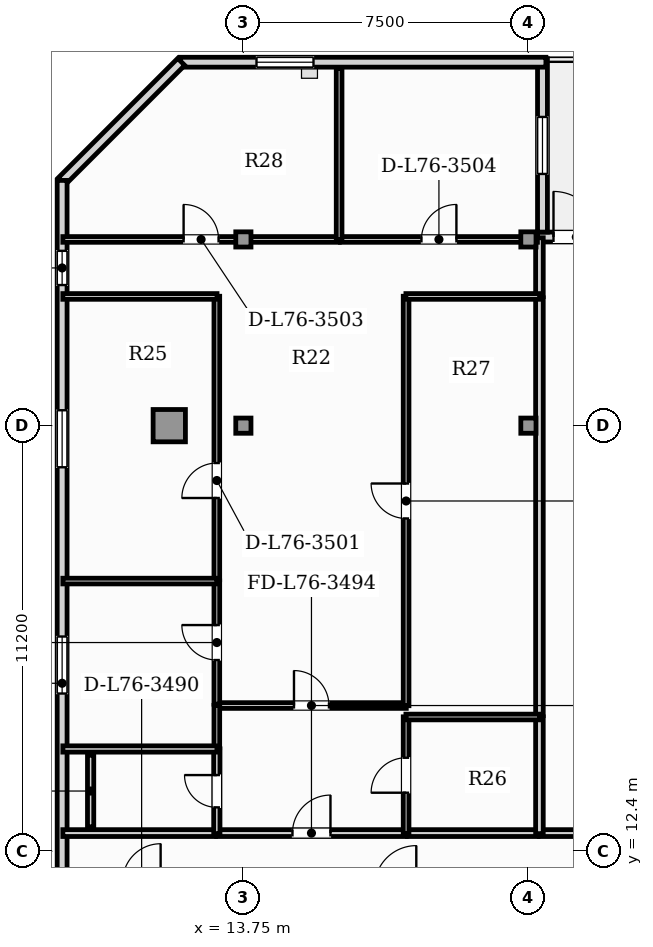
"""IFC4 building model, lengths in metres.
Left out: names, types, materials, properties, quantities, classifications, styles, units other than length and angle.
Written with IfcOpenShell. Run it as: python <this file> out.ifc"""

import sys

from ifc_helpers import new_model, si_unit, direction, frame, frame_2d, origin, origin_2d, place, context, subcontext, project, spatial, rectangle, hollow_rectangle, extrude, element, fill, save


model = new_model("IFC4")
c1 = context("Model", 3, precision=1e-05, world=origin(), true_north=direction((0.0, 1.0)))
c2 = subcontext(c1, "Body", "Model", "MODEL_VIEW")
j1 = project(units=[si_unit("LENGTHUNIT", "METRE"), si_unit("PLANEANGLEUNIT", "RADIAN")], contexts=[c1])
p1 = place(None, origin())
s1 = spatial("IfcSite", under=j1, at=p1, CompositionType="ELEMENT")
p2 = place(p1, origin())
s2 = spatial("IfcBuilding", under=s1, at=p2, CompositionType="ELEMENT")
p3 = place(p2, frame((0.0, 0.0, 308.0)))
s3 = spatial("IfcBuildingStorey", under=s2, at=p3, CompositionType="ELEMENT", Elevation=308.0)
p4 = place(p3, frame((11.8, 23.6, 0.0), z_axis=(0.0, 0.0, 1.0), x_axis=(1.0, 0.0, 0.0)))
e1 = element("IfcColumn", 1, at=p4, inside=s3, PredefinedType="USERDEFINED", context=c2, shape_type="SweptSolid", body=[
    extrude(hollow_rectangle(XDim=0.85, YDim=0.85, WallThickness=0.05, at=origin_2d()), origin(), (0.0, 0.0, 1.0), 5.05),
])
for number, where, z_axis, x_axis in (
    (2, (13.75, 23.6, 0.0), (0.0, 0.0, 1.0), (1.0, 0.0, 0.0)),
    (3, (21.25, 23.6, 0.0), (0.0, 0.0, 1.0), (1.0, 0.0, 0.0)),
    (4, (13.75, 28.5, 0.0), (0.0, 0.0, 1.0), (1.0, 0.0, 0.0)),
    (5, (21.25, 28.5, 0.0), (0.0, 0.0, 1.0), (1.0, 0.0, 0.0)),
):
    element("IfcColumn", number, at=place(p3, frame(where, z_axis=z_axis, x_axis=x_axis)), inside=s3, PredefinedType="COLUMN", context=c2, shape_type="SweptSolid", body=[
        extrude(hollow_rectangle(XDim=0.4, YDim=0.4, WallThickness=0.02, at=origin_2d()), origin(), (0.0, 0.0, 1.0), 5.05),
    ])
p5 = place(p3, frame((21.49, 28.563, 0.0), z_axis=(0.0, 0.0, 1.0), x_axis=(1.0, 0.0, 0.0)))
e6 = element("IfcWall", 6, at=p5, inside=s3, PredefinedType="SOLIDWALL", context=c2, shape_type="SweptSolid", body=[
    extrude(rectangle(XDim=1.76, YDim=0.26, at=frame_2d((0.88, 0.0))), origin(), (0.0, 0.0, 1.0), 4.85),
])
p6 = place(p5, frame((0.42, 0.0, 0.0)))
e7 = element("IfcOpeningElement", 7, at=p6, cuts=e6, PredefinedType="OPENING", context=c2, shape_type="SweptSolid", body=[
    extrude(rectangle(XDim=1.2, YDim=2.2, at=frame_2d((0.6, 1.1))), frame((0.0, 0.14, 0.0), z_axis=(0.0, -1.0, 0.0), x_axis=(1.0, 0.0, 0.0)), (0.0, 0.0, 1.0), 0.28),
])
p7 = place(p3, frame((21.62, 28.693, 0.0), z_axis=(0.0, 0.0, 1.0), x_axis=(0.0, 1.0, 0.0)))
e8 = element("IfcWall", 8, at=p7, inside=s3, PredefinedType="SOLIDWALL", context=c2, shape_type="SweptSolid", body=[
    extrude(rectangle(XDim=4.56, YDim=0.26, at=frame_2d((2.28, 0.0))), origin(), (0.0, 0.0, 1.0), 4.85),
])
p8 = place(p7, frame((1.53, 0.0, 0.9)))
e9 = element("IfcOpeningElement", 9, at=p8, cuts=e8, PredefinedType="OPENING", context=c2, shape_type="SweptSolid", body=[
    extrude(rectangle(XDim=1.5, YDim=1.95, at=frame_2d((0.75, 0.975))), frame((0.0, 0.14, 0.0), z_axis=(0.0, -1.0, 0.0), x_axis=(1.0, 0.0, 0.0)), (0.0, 0.0, 1.0), 0.28),
])
p9 = place(p3, frame((21.71, 33.163, 0.0), z_axis=(0.0, 0.0, 1.0), x_axis=(-1.0, 0.0, 0.0)))
e10 = element("IfcWall", 10, at=p9, inside=s3, PredefinedType="SOLIDWALL", context=c2, shape_type="SweptSolid", body=[
    extrude(rectangle(XDim=9.619, YDim=0.26, at=frame_2d((4.81, 0.0))), origin(), (0.0, 0.0, 1.0), 4.85),
])
p10 = place(p9, frame((6.115, 0.0, 0.9)))
e11 = element("IfcOpeningElement", 11, at=p10, cuts=e10, PredefinedType="OPENING", context=c2, shape_type="SweptSolid", body=[
    extrude(rectangle(XDim=1.5, YDim=1.95, at=frame_2d((0.75, 0.975))), frame((0.0, 0.14, 0.0), z_axis=(0.0, -1.0, 0.0), x_axis=(1.0, 0.0, 0.0)), (0.0, 0.0, 1.0), 0.28),
])
p11 = place(p3, frame((12.115, 33.173, 0.0), z_axis=(0.0, 0.0, 1.0), x_axis=(-0.707134240044, -0.707079321262, 0.0)))
e12 = element("IfcWall", 12, at=p11, inside=s3, PredefinedType="SOLIDWALL", context=c2, shape_type="SweptSolid", body=[
    extrude(rectangle(XDim=4.446, YDim=0.26, at=frame_2d((2.223, 0.0))), origin(), (0.0, 0.0, 1.0), 4.85),
])
p12 = place(p3, frame((8.981, 30.053, 0.0), z_axis=(0.0, 0.0, 1.0), x_axis=(0.0, -1.0, 0.0)))
e13 = element("IfcWall", 13, at=p12, inside=s3, PredefinedType="SOLIDWALL", context=c2, shape_type="SweptSolid", body=[
    extrude(rectangle(XDim=26.813, YDim=0.26, at=frame_2d((13.406, 0.0))), origin(), (0.0, 0.0, 1.0), 4.85),
])
p13 = place(p12, frame((20.763, 0.0, 0.85)))
e14 = element("IfcOpeningElement", 14, at=p13, cuts=e13, PredefinedType="OPENING", context=c2, shape_type="SweptSolid", body=[
    extrude(rectangle(XDim=2.4, YDim=2.0, at=frame_2d((1.2, 1.0))), frame((0.0, 0.14, 0.0), z_axis=(0.0, -1.0, 0.0), x_axis=(1.0, 0.0, 0.0)), (0.0, 0.0, 1.0), 0.28),
])
p14 = place(p12, frame((1.853, 0.0, 0.95)))
e15 = element("IfcOpeningElement", 15, at=p14, cuts=e13, PredefinedType="OPENING", context=c2, shape_type="SweptSolid", body=[
    extrude(rectangle(XDim=0.9, YDim=1.5, at=frame_2d((0.45, 0.75))), frame((0.0, 0.14, 0.0), z_axis=(0.0, -1.0, 0.0), x_axis=(1.0, 0.0, 0.0)), (0.0, 0.0, 1.0), 0.28),
])
p15 = place(p12, frame((12.001, 0.0, 0.9)))
e16 = element("IfcOpeningElement", 16, at=p15, cuts=e13, PredefinedType="OPENING", context=c2, shape_type="SweptSolid", body=[
    extrude(rectangle(XDim=1.5, YDim=1.95, at=frame_2d((0.75, 0.975))), frame((0.0, 0.14, 0.0), z_axis=(0.0, -1.0, 0.0), x_axis=(1.0, 0.0, 0.0)), (0.0, 0.0, 1.0), 0.28),
])
p16 = place(p12, frame((6.048, 0.0, 0.9)))
e17 = element("IfcOpeningElement", 17, at=p16, cuts=e13, PredefinedType="OPENING", context=c2, shape_type="SweptSolid", body=[
    extrude(rectangle(XDim=1.5, YDim=1.95, at=frame_2d((0.75, 0.975))), frame((0.0, 0.14, 0.0), z_axis=(0.0, -1.0, 0.0), x_axis=(1.0, 0.0, 0.0)), (0.0, 0.0, 1.0), 0.28),
])
p17 = place(p3, frame((21.535, 12.88, 0.0), z_axis=(0.0, 0.0, 1.0), x_axis=(1.0, 0.0, 0.0)))
e18 = element("IfcWall", 18, at=p17, inside=s3, PredefinedType="PARTITIONING", context=c2, shape_type="SweptSolid", body=[
    extrude(rectangle(XDim=11.33, YDim=0.18, at=frame_2d((5.665, 0.0))), origin(), (0.0, 0.0, 1.0), 4.85),
])
p18 = place(p17, frame((3.466, 0.0, 0.0)))
e19 = element("IfcOpeningElement", 19, at=p18, cuts=e18, PredefinedType="OPENING", context=c2, shape_type="SweptSolid", body=[
    extrude(rectangle(XDim=1.0, YDim=2.15, at=frame_2d((0.5, 1.075))), frame((0.0, 0.1, 0.0), z_axis=(0.0, -1.0, 0.0), x_axis=(1.0, 0.0, 0.0)), (0.0, 0.0, 1.0), 0.2),
])
p19 = place(p3, frame((13.047, 12.88, 0.0), z_axis=(0.0, 0.0, 1.0), x_axis=(1.0, 0.0, 0.0)))
e20 = element("IfcWall", 20, at=p19, inside=s3, PredefinedType="PARTITIONING", context=c2, shape_type="SweptSolid", body=[
    extrude(rectangle(XDim=4.99, YDim=0.18, at=frame_2d((2.495, 0.0))), origin(), (0.0, 0.0, 1.0), 4.85),
])
p20 = place(p19, frame((1.995, 0.0, 0.0)))
e21 = element("IfcOpeningElement", 21, at=p20, cuts=e20, PredefinedType="OPENING", context=c2, shape_type="SweptSolid", body=[
    extrude(rectangle(XDim=1.0, YDim=2.15, at=frame_2d((0.5, 1.075))), frame((0.0, 0.1, 0.0), z_axis=(0.0, -1.0, 0.0), x_axis=(1.0, 0.0, 0.0)), (0.0, 0.0, 1.0), 0.2),
])
p21 = place(p3, frame((9.0, 12.88, 0.0), z_axis=(0.0, 0.0, 1.0), x_axis=(1.0, 0.0, 0.0)))
e22 = element("IfcWall", 22, at=p21, inside=s3, PredefinedType="PARTITIONING", context=c2, shape_type="SweptSolid", body=[
    extrude(rectangle(XDim=4.016, YDim=0.18, at=frame_2d((2.008, 0.0))), origin(), (0.0, 0.0, 1.0), 4.85),
])
p22 = place(p3, frame((18.067, 12.88, 0.0), z_axis=(0.0, 0.0, 1.0), x_axis=(1.0, 0.0, 0.0)))
e23 = element("IfcWall", 23, at=p22, inside=s3, PredefinedType="PARTITIONING", context=c2, shape_type="SweptSolid", body=[
    extrude(rectangle(XDim=3.438, YDim=0.18, at=frame_2d((1.719, 0.0))), origin(), (0.0, 0.0, 1.0), 4.85),
])
p23 = place(p3, frame((21.54, 26.995, 0.0), z_axis=(0.0, 0.0, 1.0), x_axis=(0.0, 1.0, 0.0)))
e24 = element("IfcWall", 24, at=p23, inside=s3, PredefinedType="PARTITIONING", context=c2, shape_type="SweptSolid", body=[
    extrude(rectangle(XDim=1.549, YDim=0.2, at=frame_2d((0.774, 0.0))), origin(), (0.0, 0.0, 1.0), 4.85),
])
p24 = place(p3, frame((21.54, 12.865, 0.0), z_axis=(0.0, 0.0, 1.0), x_axis=(0.0, 1.0, 0.0)))
e25 = element("IfcWall", 25, at=p24, inside=s3, PredefinedType="PARTITIONING", context=c2, shape_type="SweptSolid", body=[
    extrude(rectangle(XDim=3.074, YDim=0.2, at=frame_2d((1.537, 0.0))), origin(), (0.0, 0.0, 1.0), 4.85),
])
p25 = place(p3, frame((21.54, 15.969, 0.0), z_axis=(0.0, 0.0, 1.0), x_axis=(0.0, 1.0, 0.0)))
e26 = element("IfcWall", 26, at=p25, inside=s3, PredefinedType="PARTITIONING", context=c2, shape_type="SweptSolid", body=[
    extrude(rectangle(XDim=10.996, YDim=0.2, at=frame_2d((5.498, 0.0))), origin(), (0.0, 0.0, 1.0), 4.85),
])
p26 = place(p3, frame((13.047, 16.236, 0.0), z_axis=(0.0, 0.0, 1.0), x_axis=(1.0, 0.0, 0.0)))
e27 = element("IfcWall", 27, at=p26, inside=s3, PredefinedType="PARTITIONING", context=c2, shape_type="SweptSolid", body=[
    extrude(rectangle(XDim=4.99, YDim=0.15, at=frame_2d((2.495, 0.0))), origin(), (0.0, 0.0, 1.0), 4.85),
])
p27 = place(p26, frame((2.035, 0.0, 0.0)))
e28 = element("IfcOpeningElement", 28, at=p27, cuts=e27, PredefinedType="OPENING", context=c2, shape_type="SweptSolid", body=[
    extrude(rectangle(XDim=0.92, YDim=2.1, at=frame_2d((0.46, 1.05))), frame((0.0, 0.085, 0.0), z_axis=(0.0, -1.0, 0.0), x_axis=(1.0, 0.0, 0.0)), (0.0, 0.0, 1.0), 0.17),
])
p28 = place(p3, frame((13.052, 12.865, 0.0), z_axis=(0.0, 0.0, 1.0), x_axis=(0.0, 1.0, 0.0)))
e29 = element("IfcWall", 29, at=p28, inside=s3, PredefinedType="PLUMBINGWALL", context=c2, shape_type="SweptSolid", body=[
    extrude(rectangle(XDim=2.233, YDim=0.165, at=frame_2d((1.116, 0.0))), origin(), (0.0, 0.0, 1.0), 4.85),
])
p29 = place(p28, frame((0.691, 0.0, 0.0)))
e30 = element("IfcOpeningElement", 30, at=p29, cuts=e29, PredefinedType="OPENING", context=c2, shape_type="SweptSolid", body=[
    extrude(rectangle(XDim=0.85, YDim=2.1, at=frame_2d((0.425, 1.05))), frame((0.0, 0.093, 0.0), z_axis=(0.0, -1.0, 0.0), x_axis=(1.0, 0.0, 0.0)), (0.0, 0.0, 1.0), 0.185),
])
p30 = place(p3, frame((13.052, 15.128, 0.0), z_axis=(0.0, 0.0, 1.0), x_axis=(0.0, 1.0, 0.0)))
e31 = element("IfcWall", 31, at=p30, inside=s3, PredefinedType="PARTITIONING", context=c2, shape_type="SweptSolid", body=[
    extrude(rectangle(XDim=1.114, YDim=0.15, at=frame_2d((0.557, 0.0))), origin(), (0.0, 0.0, 1.0), 4.85),
])
p31 = place(p3, frame((18.031, 12.865, 0.0), z_axis=(0.0, 0.0, 1.0), x_axis=(0.0, 1.0, 0.0)))
e32 = element("IfcWall", 32, at=p31, inside=s3, PredefinedType="PARTITIONING", context=c2, shape_type="SweptSolid", body=[
    extrude(rectangle(XDim=3.074, YDim=0.15, at=frame_2d((1.537, 0.0))), origin(), (0.0, 0.0, 1.0), 4.85),
])
p32 = place(p31, frame((1.077, 0.0, 0.0)))
e33 = element("IfcOpeningElement", 33, at=p32, cuts=e32, PredefinedType="OPENING", context=c2, shape_type="SweptSolid", body=[
    extrude(rectangle(XDim=0.92, YDim=2.1, at=frame_2d((0.46, 1.05))), frame((0.0, 0.085, 0.0), z_axis=(0.0, -1.0, 0.0), x_axis=(1.0, 0.0, 0.0)), (0.0, 0.0, 1.0), 0.17),
])
p33 = place(p3, frame((13.052, 16.271, 0.0), z_axis=(0.0, 0.0, 1.0), x_axis=(0.0, 1.0, 0.0)))
e34 = element("IfcWall", 34, at=p33, inside=s3, PredefinedType="PARTITIONING", context=c2, shape_type="SweptSolid", body=[
    extrude(rectangle(XDim=3.245, YDim=0.15, at=frame_2d((1.623, 0.0))), origin(), (0.0, 0.0, 1.0), 4.85),
])
p34 = place(p33, frame((1.162, 0.0, 0.0)))
e35 = element("IfcOpeningElement", 35, at=p34, cuts=e34, PredefinedType="OPENING", context=c2, shape_type="SweptSolid", body=[
    extrude(rectangle(XDim=0.92, YDim=2.1, at=frame_2d((0.46, 1.05))), frame((0.0, 0.085, 0.0), z_axis=(0.0, -1.0, 0.0), x_axis=(1.0, 0.0, 0.0)), (0.0, 0.0, 1.0), 0.17),
])
p35 = place(p3, frame((13.052, 19.546, 0.0), z_axis=(0.0, 0.0, 1.0), x_axis=(0.0, 1.0, 0.0)))
e36 = element("IfcWall", 36, at=p35, inside=s3, PredefinedType="PARTITIONING", context=c2, shape_type="SweptSolid", body=[
    extrude(rectangle(XDim=7.459, YDim=0.15, at=frame_2d((3.729, 0.0))), origin(), (0.0, 0.0, 1.0), 4.85),
])
p36 = place(p35, frame((2.151, 0.0, 0.0)))
e37 = element("IfcOpeningElement", 37, at=p36, cuts=e36, PredefinedType="OPENING", context=c2, shape_type="SweptSolid", body=[
    extrude(rectangle(XDim=0.92, YDim=2.1, at=frame_2d((0.46, 1.05))), frame((0.0, 0.085, 0.0), z_axis=(0.0, -1.0, 0.0), x_axis=(1.0, 0.0, 0.0)), (0.0, 0.0, 1.0), 0.17),
])
p37 = place(p3, frame((9.0, 27.0, 0.0), z_axis=(0.0, 0.0, 1.0), x_axis=(1.0, 0.0, 0.0)))
e38 = element("IfcWall", 38, at=p37, inside=s3, PredefinedType="PARTITIONING", context=c2, shape_type="SweptSolid", body=[
    extrude(rectangle(XDim=4.056, YDim=0.15, at=frame_2d((2.028, 0.0))), origin(), (0.0, 0.0, 1.0), 4.85),
])
p38 = place(p3, frame((18.031, 16.231, 0.0), z_axis=(0.0, 0.0, 1.0), x_axis=(0.0, 1.0, 0.0)))
e39 = element("IfcWall", 39, at=p38, inside=s3, PredefinedType="PARTITIONING", context=c2, shape_type="SweptSolid", body=[
    extrude(rectangle(XDim=10.774, YDim=0.15, at=frame_2d((5.387, 0.0))), origin(), (0.0, 0.0, 1.0), 4.85),
])
p39 = place(p38, frame((4.927, 0.0, 0.0)))
e40 = element("IfcOpeningElement", 40, at=p39, cuts=e39, PredefinedType="OPENING", context=c2, shape_type="SweptSolid", body=[
    extrude(rectangle(XDim=0.92, YDim=2.1, at=frame_2d((0.46, 1.05))), frame((0.0, 0.085, 0.0), z_axis=(0.0, -1.0, 0.0), x_axis=(1.0, 0.0, 0.0)), (0.0, 0.0, 1.0), 0.17),
])
p40 = place(p3, frame((18.027, 27.0, 0.0), z_axis=(0.0, 0.0, 1.0), x_axis=(1.0, 0.0, 0.0)))
e41 = element("IfcWall", 41, at=p40, inside=s3, PredefinedType="PARTITIONING", context=c2, shape_type="SweptSolid", body=[
    extrude(rectangle(XDim=3.518, YDim=0.15, at=frame_2d((1.759, 0.0))), origin(), (0.0, 0.0, 1.0), 4.85),
])
p41 = place(p3, frame((9.0, 28.5, 0.0), z_axis=(0.0, 0.0, 1.0), x_axis=(1.0, 0.0, 0.0)))
e42 = element("IfcWall", 42, at=p41, inside=s3, PredefinedType="PARTITIONING", context=c2, shape_type="SweptSolid", body=[
    extrude(rectangle(XDim=7.274, YDim=0.15, at=frame_2d((3.637, 0.0))), origin(), (0.0, 0.0, 1.0), 4.317),
])
p42 = place(p41, frame((3.177, 0.0, 0.0)))
e43 = element("IfcOpeningElement", 43, at=p42, cuts=e42, PredefinedType="OPENING", context=c2, shape_type="SweptSolid", body=[
    extrude(rectangle(XDim=0.92, YDim=2.1, at=frame_2d((0.46, 1.05))), frame((0.0, 0.085, 0.0), z_axis=(0.0, -1.0, 0.0), x_axis=(1.0, 0.0, 0.0)), (0.0, 0.0, 1.0), 0.17),
])
p43 = place(p3, frame((16.304, 28.5, 0.0), z_axis=(0.0, 0.0, 1.0), x_axis=(1.0, 0.0, 0.0)))
e44 = element("IfcWall", 44, at=p43, inside=s3, PredefinedType="PARTITIONING", context=c2, shape_type="SweptSolid", body=[
    extrude(rectangle(XDim=5.183, YDim=0.15, at=frame_2d((2.591, 0.0))), origin(), (0.0, 0.0, 1.0), 4.317),
])
p44 = place(p43, frame((2.131, 0.0, 0.0)))
e45 = element("IfcOpeningElement", 45, at=p44, cuts=e44, PredefinedType="OPENING", context=c2, shape_type="SweptSolid", body=[
    extrude(rectangle(XDim=0.92, YDim=2.1, at=frame_2d((0.46, 1.05))), frame((0.0, 0.085, 0.0), z_axis=(0.0, -1.0, 0.0), x_axis=(1.0, 0.0, 0.0)), (0.0, 0.0, 1.0), 0.17),
])
p45 = place(p3, frame((9.0, 15.093, 0.0), z_axis=(0.0, 0.0, 1.0), x_axis=(1.0, 0.0, 0.0)))
e46 = element("IfcWall", 46, at=p45, inside=s3, PredefinedType="PLUMBINGWALL", context=c2, shape_type="SweptSolid", body=[
    extrude(rectangle(XDim=4.056, YDim=0.165, at=frame_2d((2.028, 0.0))), origin(), (0.0, 0.0, 1.0), 4.85),
])
p46 = place(p3, frame((9.0, 19.511, 0.0), z_axis=(0.0, 0.0, 1.0), x_axis=(1.0, 0.0, 0.0)))
e47 = element("IfcWall", 47, at=p46, inside=s3, PredefinedType="PARTITIONING", context=c2, shape_type="SweptSolid", body=[
    extrude(rectangle(XDim=4.056, YDim=0.15, at=frame_2d((2.028, 0.0))), origin(), (0.0, 0.0, 1.0), 4.85),
])
p47 = place(p3, frame((18.027, 15.934, 0.0), z_axis=(0.0, 0.0, 1.0), x_axis=(1.0, 0.0, 0.0)))
e48 = element("IfcWall", 48, at=p47, inside=s3, PredefinedType="PARTITIONING", context=c2, shape_type="SweptSolid", body=[
    extrude(rectangle(XDim=3.518, YDim=0.15, at=frame_2d((1.759, 0.0))), origin(), (0.0, 0.0, 1.0), 4.85),
])
p48 = place(p3, frame((16.269, 28.495, 0.0), z_axis=(0.0, 0.0, 1.0), x_axis=(0.0, 1.0, 0.0)))
e49 = element("IfcWall", 49, at=p48, inside=s3, PredefinedType="PARTITIONING", context=c2, shape_type="SweptSolid", body=[
    extrude(rectangle(XDim=4.501, YDim=0.15, at=frame_2d((2.25, 0.0))), origin(), (0.0, 0.0, 1.0), 4.85),
])
p49 = place(p3, frame((9.731, 13.045, 0.0), z_axis=(0.0, 0.0, 1.0), x_axis=(0.0, 1.0, 0.0)))
e50 = element("IfcWall", 50, at=p49, inside=s3, PredefinedType="PLUMBINGWALL", context=c2, shape_type="SweptSolid", body=[
    extrude(rectangle(XDim=1.883, YDim=0.165, at=frame_2d((0.941, 0.0))), origin(), (0.0, 0.0, 1.0), 4.85),
])
p50 = place(p6, origin())
e51 = element("IfcDoor", 51, at=p50, inside=s3, OperationType="SINGLE_SWING_LEFT", PredefinedType="DOOR", context=c2, shape_type="SweptSolid", body=[
    extrude(rectangle(XDim=1.2, YDim=2.2, at=frame_2d((0.6, 1.1))), frame((0.0, 0.025, 0.0), z_axis=(0.0, -1.0, 0.0), x_axis=(1.0, 0.0, 0.0)), (0.0, 0.0, 1.0), 0.05),
])
fill(e7, e51)
p51 = place(p14, origin())
e52 = element("IfcWindow", 52, at=p51, inside=s3, PartitioningType="SINGLE_PANEL", PredefinedType="WINDOW", context=c2, shape_type="SweptSolid", body=[
    extrude(rectangle(XDim=0.9, YDim=1.5, at=frame_2d((0.45, 0.75))), frame((0.0, 0.03, 0.0), z_axis=(0.0, -1.0, 0.0), x_axis=(1.0, 0.0, 0.0)), (0.0, 0.0, 1.0), 0.06),
])
fill(e15, e52)
p52 = place(p15, origin())
e53 = element("IfcWindow", 53, at=p52, inside=s3, PartitioningType="SINGLE_PANEL", PredefinedType="WINDOW", context=c2, shape_type="SweptSolid", body=[
    extrude(rectangle(XDim=1.5, YDim=1.95, at=frame_2d((0.75, 0.975))), frame((0.0, 0.03, 0.0), z_axis=(0.0, -1.0, 0.0), x_axis=(1.0, 0.0, 0.0)), (0.0, 0.0, 1.0), 0.06),
])
fill(e16, e53)
p53 = place(p16, origin())
e54 = element("IfcWindow", 54, at=p53, inside=s3, PartitioningType="SINGLE_PANEL", PredefinedType="WINDOW", context=c2, shape_type="SweptSolid", body=[
    extrude(rectangle(XDim=1.5, YDim=1.95, at=frame_2d((0.75, 0.975))), frame((0.0, 0.03, 0.0), z_axis=(0.0, -1.0, 0.0), x_axis=(1.0, 0.0, 0.0)), (0.0, 0.0, 1.0), 0.06),
])
fill(e17, e54)
p54 = place(p10, origin())
e55 = element("IfcWindow", 55, at=p54, inside=s3, PartitioningType="SINGLE_PANEL", PredefinedType="WINDOW", context=c2, shape_type="SweptSolid", body=[
    extrude(rectangle(XDim=1.5, YDim=1.95, at=frame_2d((0.75, 0.975))), frame((0.0, 0.03, 0.0), z_axis=(0.0, -1.0, 0.0), x_axis=(1.0, 0.0, 0.0)), (0.0, 0.0, 1.0), 0.06),
])
fill(e11, e55)
p55 = place(p8, origin())
e56 = element("IfcWindow", 56, at=p55, inside=s3, PartitioningType="SINGLE_PANEL", PredefinedType="WINDOW", context=c2, shape_type="SweptSolid", body=[
    extrude(rectangle(XDim=1.5, YDim=1.95, at=frame_2d((0.75, 0.975))), frame((0.0, 0.03, 0.0), z_axis=(0.0, -1.0, 0.0), x_axis=(1.0, 0.0, 0.0)), (0.0, 0.0, 1.0), 0.06),
])
fill(e9, e56)
p56 = place(p20, origin())
e57 = element("IfcDoor", 57, at=p56, inside=s3, OperationType="SINGLE_SWING_RIGHT", PredefinedType="DOOR", context=c2, shape_type="SweptSolid", body=[
    extrude(rectangle(XDim=1.0, YDim=2.15, at=frame_2d((0.5, 1.075))), frame((0.0, 0.025, 0.0), z_axis=(0.0, -1.0, 0.0), x_axis=(1.0, 0.0, 0.0)), (0.0, 0.0, 1.0), 0.05),
])
fill(e21, e57)
p57 = place(p27, origin())
e58 = element("IfcDoor", 58, at=p57, inside=s3, OperationType="SINGLE_SWING_LEFT", PredefinedType="DOOR", context=c2, shape_type="SweptSolid", body=[
    extrude(rectangle(XDim=0.92, YDim=2.1, at=frame_2d((0.46, 1.05))), frame((0.0, 0.025, 0.0), z_axis=(0.0, -1.0, 0.0), x_axis=(1.0, 0.0, 0.0)), (0.0, 0.0, 1.0), 0.05),
])
fill(e28, e58)
p58 = place(p29, origin())
e59 = element("IfcDoor", 59, at=p58, inside=s3, OperationType="SINGLE_SWING_RIGHT", PredefinedType="DOOR", context=c2, shape_type="SweptSolid", body=[
    extrude(rectangle(XDim=0.85, YDim=2.1, at=frame_2d((0.425, 1.05))), frame((0.0, 0.025, 0.0), z_axis=(0.0, -1.0, 0.0), x_axis=(1.0, 0.0, 0.0)), (0.0, 0.0, 1.0), 0.05),
])
fill(e30, e59)
p59 = place(p32, origin())
e60 = element("IfcDoor", 60, at=p59, inside=s3, OperationType="SINGLE_SWING_LEFT", PredefinedType="DOOR", context=c2, shape_type="SweptSolid", body=[
    extrude(rectangle(XDim=0.92, YDim=2.1, at=frame_2d((0.46, 1.05))), frame((0.0, 0.025, 0.0), z_axis=(0.0, -1.0, 0.0), x_axis=(1.0, 0.0, 0.0)), (0.0, 0.0, 1.0), 0.05),
])
fill(e33, e60)
p60 = place(p34, origin())
e61 = element("IfcDoor", 61, at=p60, inside=s3, OperationType="SINGLE_SWING_RIGHT", PredefinedType="DOOR", context=c2, shape_type="SweptSolid", body=[
    extrude(rectangle(XDim=0.92, YDim=2.1, at=frame_2d((0.46, 1.05))), frame((0.0, 0.025, 0.0), z_axis=(0.0, -1.0, 0.0), x_axis=(1.0, 0.0, 0.0)), (0.0, 0.0, 1.0), 0.05),
])
fill(e35, e61)
p61 = place(p36, origin())
e62 = element("IfcDoor", 62, at=p61, inside=s3, OperationType="SINGLE_SWING_LEFT", PredefinedType="DOOR", context=c2, shape_type="SweptSolid", body=[
    extrude(rectangle(XDim=0.92, YDim=2.1, at=frame_2d((0.46, 1.05))), frame((0.0, 0.025, 0.0), z_axis=(0.0, -1.0, 0.0), x_axis=(1.0, 0.0, 0.0)), (0.0, 0.0, 1.0), 0.05),
])
fill(e37, e62)
p62 = place(p39, origin())
e63 = element("IfcDoor", 63, at=p62, inside=s3, OperationType="SINGLE_SWING_RIGHT", PredefinedType="DOOR", context=c2, shape_type="SweptSolid", body=[
    extrude(rectangle(XDim=0.92, YDim=2.1, at=frame_2d((0.46, 1.05))), frame((0.0, 0.025, 0.0), z_axis=(0.0, -1.0, 0.0), x_axis=(1.0, 0.0, 0.0)), (0.0, 0.0, 1.0), 0.05),
])
fill(e40, e63)
p63 = place(p42, origin())
e64 = element("IfcDoor", 64, at=p63, inside=s3, OperationType="SINGLE_SWING_LEFT", PredefinedType="DOOR", context=c2, shape_type="SweptSolid", body=[
    extrude(rectangle(XDim=0.92, YDim=2.1, at=frame_2d((0.46, 1.05))), frame((0.0, 0.025, 0.0), z_axis=(0.0, -1.0, 0.0), x_axis=(1.0, 0.0, 0.0)), (0.0, 0.0, 1.0), 0.05),
])
fill(e43, e64)
p64 = place(p44, origin())
e65 = element("IfcDoor", 65, at=p64, inside=s3, OperationType="SINGLE_SWING_RIGHT", PredefinedType="DOOR", context=c2, shape_type="SweptSolid", body=[
    extrude(rectangle(XDim=0.92, YDim=2.1, at=frame_2d((0.46, 1.05))), frame((0.0, 0.025, 0.0), z_axis=(0.0, -1.0, 0.0), x_axis=(1.0, 0.0, 0.0)), (0.0, 0.0, 1.0), 0.05),
])
fill(e45, e65)
save(model, sys.argv[1])
